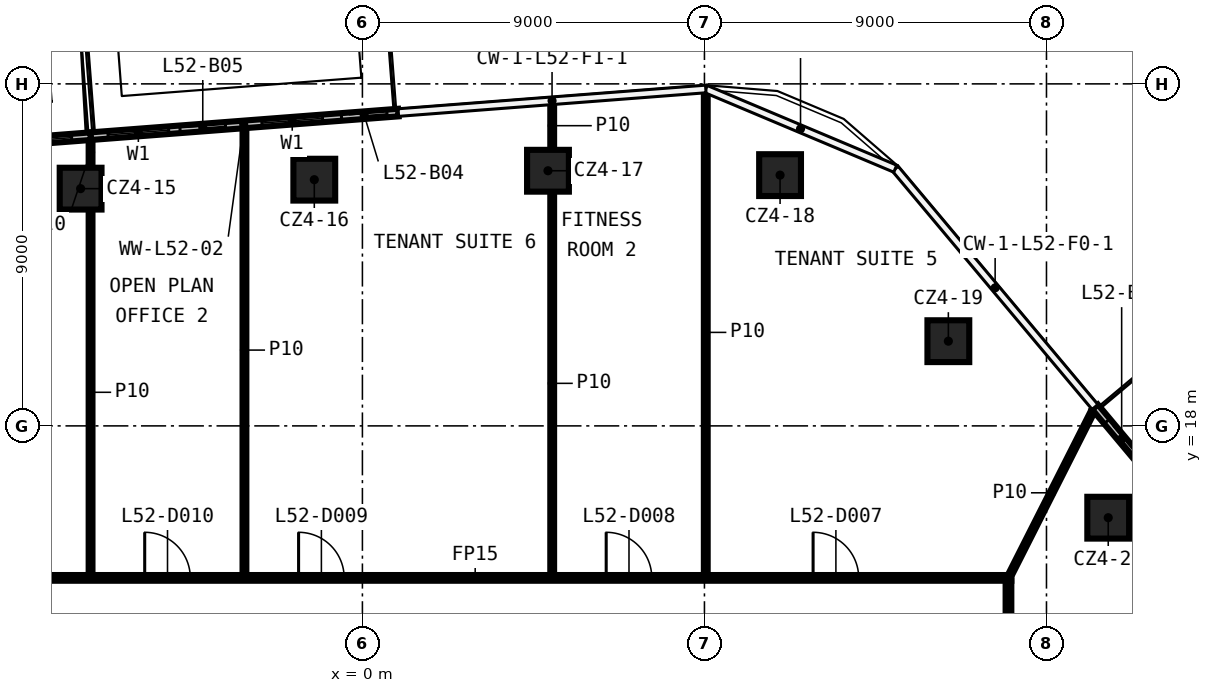
"""IFC4 building model, lengths in metres.
Left out: names, types, materials, properties, quantities, classifications, styles, units other than length and angle.
Written with IfcOpenShell. Run it as: python <this file> out.ifc"""

import sys

from ifc_helpers import new_model, si_unit, direction, frame, frame_2d, origin, origin_2d, place, context, subcontext, project, spatial, rectangle, extrude, element, fill, save


model = new_model("IFC4")
c1 = context("Model", 3, precision=1e-05, world=origin(), true_north=direction((0.0, 1.0)))
c2 = subcontext(c1, "Body", "Model", "MODEL_VIEW")
j1 = project(units=[si_unit("LENGTHUNIT", "METRE"), si_unit("PLANEANGLEUNIT", "RADIAN")], contexts=[c1])
p1 = place(None, origin())
s1 = spatial("IfcSite", under=j1, at=p1, CompositionType="ELEMENT")
p2 = place(p1, origin())
s2 = spatial("IfcBuilding", under=s1, at=p2, CompositionType="ELEMENT")
p3 = place(p2, frame((0.0, 0.0, 249.6)))
s3 = spatial("IfcBuildingStorey", under=s2, at=p3, CompositionType="ELEMENT", Elevation=249.6)
for number, where, z_axis, x_axis in (
    (1, (-7.415, 24.243, 0.0), (0.0, 0.0, 1.0), (1.0, 0.0, 0.0)),
    (2, (-1.266, 24.479, 0.0), (0.0, 0.0, 1.0), (1.0, 0.0, 0.0)),
    (3, (4.883, 24.714, 0.0), (0.0, 0.0, 1.0), (1.0, 0.0, 0.0)),
    (4, (10.99, 24.599, 0.0), (0.0, 0.0, 1.0), (1.0, 0.0, 0.0)),
    (5, (15.418, 20.229, 0.0), (0.0, 0.0, 1.0), (1.0, 0.0, 0.0)),
    (6, (19.625, 15.584, 0.0), (0.0, 0.0, 1.0), (1.0, 0.0, 0.0)),
):
    element("IfcColumn", number, at=place(p3, frame(where, z_axis=z_axis, x_axis=x_axis)), inside=s3, PredefinedType="COLUMN", context=c2, shape_type="SweptSolid", body=[
        extrude(rectangle(XDim=1.1, YDim=1.1, at=origin_2d()), origin(), (0.0, 0.0, 1.0), 3.82),
    ])
p4 = place(p3, frame((-9.075, 14.0, 0.0), z_axis=(0.0, 0.0, 1.0), x_axis=(1.0, 0.0, 0.0)))
e7 = element("IfcWall", 7, at=p4, inside=s3, PredefinedType="PARTITIONING", context=c2, shape_type="SweptSolid", body=[
    extrude(rectangle(XDim=26.15, YDim=0.15, at=frame_2d((13.075, 0.0))), origin(), (0.0, 0.0, 1.0), 3.82),
])
p5 = place(p4, frame((20.934, 0.0, 0.0)))
e8 = element("IfcOpeningElement", 8, at=p5, cuts=e7, PredefinedType="OPENING", context=c2, shape_type="SweptSolid", body=[
    extrude(rectangle(XDim=1.2, YDim=2.1, at=frame_2d((0.6, 1.05))), frame((0.0, 0.085, 0.0), z_axis=(0.0, -1.0, 0.0), x_axis=(1.0, 0.0, 0.0)), (0.0, 0.0, 1.0), 0.17),
])
p6 = place(p4, frame((15.49, 0.0, 0.0)))
e9 = element("IfcOpeningElement", 9, at=p6, cuts=e7, PredefinedType="OPENING", context=c2, shape_type="SweptSolid", body=[
    extrude(rectangle(XDim=1.2, YDim=2.1, at=frame_2d((0.6, 1.05))), frame((0.0, 0.085, 0.0), z_axis=(0.0, -1.0, 0.0), x_axis=(1.0, 0.0, 0.0)), (0.0, 0.0, 1.0), 0.17),
])
p7 = place(p4, frame((7.396, 0.0, 0.0)))
e10 = element("IfcOpeningElement", 10, at=p7, cuts=e7, PredefinedType="OPENING", context=c2, shape_type="SweptSolid", body=[
    extrude(rectangle(XDim=1.2, YDim=2.1, at=frame_2d((0.6, 1.05))), frame((0.0, 0.085, 0.0), z_axis=(0.0, -1.0, 0.0), x_axis=(1.0, 0.0, 0.0)), (0.0, 0.0, 1.0), 0.17),
])
p8 = place(p4, frame((3.346, 0.0, 0.0)))
e11 = element("IfcOpeningElement", 11, at=p8, cuts=e7, PredefinedType="OPENING", context=c2, shape_type="SweptSolid", body=[
    extrude(rectangle(XDim=1.2, YDim=2.1, at=frame_2d((0.6, 1.05))), frame((0.0, 0.085, 0.0), z_axis=(0.0, -1.0, 0.0), x_axis=(1.0, 0.0, 0.0)), (0.0, 0.0, 1.0), 0.17),
])
p9 = place(p3, frame((17.0, 14.0, 0.0), z_axis=(0.0, 0.0, 1.0), x_axis=(0.451643796449, 0.892198341811, 0.0)))
e12 = element("IfcWall", 12, at=p9, inside=s3, PredefinedType="PARTITIONING", context=c2, shape_type="SweptSolid", body=[
    extrude(rectangle(XDim=5.02, YDim=0.1, at=frame_2d((2.51, 0.0))), origin(), (0.0, 0.0, 1.0), 3.82),
])
p10 = place(p3, frame((17.0, 13.925, 0.0), z_axis=(0.0, 0.0, 1.0), x_axis=(0.0, -1.0, 0.0)))
e13 = element("IfcWall", 13, at=p10, inside=s3, PredefinedType="PARTITIONING", context=c2, shape_type="SweptSolid", body=[
    extrude(rectangle(XDim=27.85, YDim=0.15, at=frame_2d((13.925, 0.0))), origin(), (0.0, 0.0, 1.0), 3.82),
])
p11 = place(p10, frame((16.802, 0.0, 0.0)))
e14 = element("IfcOpeningElement", 14, at=p11, cuts=e13, PredefinedType="OPENING", context=c2, shape_type="SweptSolid", body=[
    extrude(rectangle(XDim=1.2, YDim=2.1, at=frame_2d((0.6, 1.05))), frame((0.0, 0.085, 0.0), z_axis=(0.0, -1.0, 0.0), x_axis=(1.0, 0.0, 0.0)), (0.0, 0.0, 1.0), 0.17),
])
p12 = place(p10, frame((12.534, 0.0, 0.0)))
e15 = element("IfcOpeningElement", 15, at=p12, cuts=e13, PredefinedType="OPENING", context=c2, shape_type="SweptSolid", body=[
    extrude(rectangle(XDim=1.2, YDim=2.1, at=frame_2d((0.6, 1.05))), frame((0.0, 0.085, 0.0), z_axis=(0.0, -1.0, 0.0), x_axis=(1.0, 0.0, 0.0)), (0.0, 0.0, 1.0), 0.17),
])
p13 = place(p3, frame((9.035, 14.075, 0.0), z_axis=(0.0, 0.0, 1.0), x_axis=(0.0, 1.0, 0.0)))
e16 = element("IfcWall", 16, at=p13, inside=s3, PredefinedType="PARTITIONING", context=c2, shape_type="SweptSolid", body=[
    extrude(rectangle(XDim=12.771, YDim=0.1, at=frame_2d((6.385, 0.0))), origin(), (0.0, 0.0, 1.0), 3.82),
])
p14 = place(p3, frame((4.994, 14.075, 0.0), z_axis=(0.0, 0.0, 1.0), x_axis=(0.0, 1.0, 0.0)))
e17 = element("IfcWall", 17, at=p14, inside=s3, PredefinedType="PARTITIONING", context=c2, shape_type="SweptSolid", body=[
    extrude(rectangle(XDim=10.089, YDim=0.1, at=frame_2d((5.044, 0.0))), origin(), (0.0, 0.0, 1.0), 3.82),
])
p15 = place(p3, frame((4.994, 25.264, 0.0), z_axis=(0.0, 0.0, 1.0), x_axis=(0.0, 1.0, 0.0)))
e18 = element("IfcWall", 18, at=p15, inside=s3, PredefinedType="PARTITIONING", context=c2, shape_type="SweptSolid", body=[
    extrude(rectangle(XDim=1.272, YDim=0.1, at=frame_2d((0.636, 0.0))), origin(), (0.0, 0.0, 1.0), 3.82),
])
p16 = place(p3, frame((-3.104, 14.075, 0.0), z_axis=(0.0, 0.0, 1.0), x_axis=(0.0, 1.0, 0.0)))
e19 = element("IfcWall", 19, at=p16, inside=s3, PredefinedType="PARTITIONING", context=c2, shape_type="SweptSolid", body=[
    extrude(rectangle(XDim=11.839, YDim=0.1, at=frame_2d((5.92, 0.0))), origin(), (0.0, 0.0, 1.0), 3.82),
])
p17 = place(p3, frame((-7.153, 14.075, 0.0), z_axis=(0.0, 0.0, 1.0), x_axis=(0.0, 1.0, 0.0)))
e20 = element("IfcWall", 20, at=p17, inside=s3, PredefinedType="PARTITIONING", context=c2, shape_type="SweptSolid", body=[
    extrude(rectangle(XDim=9.618, YDim=0.1, at=frame_2d((4.809, 0.0))), origin(), (0.0, 0.0, 1.0), 3.82),
])
p18 = place(p3, frame((-7.153, 24.793, 0.0), z_axis=(0.0, 0.0, 1.0), x_axis=(0.0, 1.0, 0.0)))
e21 = element("IfcWall", 21, at=p18, inside=s3, PredefinedType="PARTITIONING", context=c2, shape_type="SweptSolid", body=[
    extrude(rectangle(XDim=0.811, YDim=0.1, at=frame_2d((0.405, 0.0))), origin(), (0.0, 0.0, 1.0), 3.82),
])
p19 = place(p3, frame((27.162, 9.091, 0.0), z_axis=(0.0, 0.0, 1.0), x_axis=(-0.642398297857, 0.766370946025, 0.0)))
e22 = element("IfcWall", 22, at=p19, inside=s3, PredefinedType="SOLIDWALL", context=c2, shape_type="SweptSolid", body=[
    extrude(rectangle(XDim=12.275, YDim=0.2, at=frame_2d((6.137, 0.0))), origin(), (0.0, 0.0, 1.0), 3.82),
])
p20 = place(p19, frame((2.0, 0.0, 0.6)))
e23 = element("IfcOpeningElement", 23, at=p20, cuts=e22, PredefinedType="OPENING", context=c2, shape_type="SweptSolid", body=[
    extrude(rectangle(XDim=1.6, YDim=2.4, at=frame_2d((0.8, 1.2))), frame((0.0, 0.11, 0.0), z_axis=(0.0, -1.0, 0.0), x_axis=(1.0, 0.0, 0.0)), (0.0, 0.0, 1.0), 0.22),
])
p21 = place(p19, frame((0.5, 0.0, 0.0)))
e24 = element("IfcOpeningElement", 24, at=p21, cuts=e22, PredefinedType="OPENING", context=c2, shape_type="SweptSolid", body=[
    extrude(rectangle(XDim=1.2, YDim=2.4, at=frame_2d((0.6, 1.2))), frame((0.0, 0.11, 0.0), z_axis=(0.0, -1.0, 0.0), x_axis=(1.0, 0.0, 0.0)), (0.0, 0.0, 1.0), 0.22),
])
p22 = place(p19, frame((6.092, 0.0, 0.6)))
e25 = element("IfcOpeningElement", 25, at=p22, cuts=e22, PredefinedType="OPENING", context=c2, shape_type="SweptSolid", body=[
    extrude(rectangle(XDim=1.6, YDim=2.4, at=frame_2d((0.8, 1.2))), frame((0.0, 0.11, 0.0), z_axis=(0.0, -1.0, 0.0), x_axis=(1.0, 0.0, 0.0)), (0.0, 0.0, 1.0), 0.22),
])
p23 = place(p19, frame((4.592, 0.0, 0.0)))
e26 = element("IfcOpeningElement", 26, at=p23, cuts=e22, PredefinedType="OPENING", context=c2, shape_type="SweptSolid", body=[
    extrude(rectangle(XDim=1.2, YDim=2.4, at=frame_2d((0.6, 1.2))), frame((0.0, 0.11, 0.0), z_axis=(0.0, -1.0, 0.0), x_axis=(1.0, 0.0, 0.0)), (0.0, 0.0, 1.0), 0.22),
])
p24 = place(p19, frame((8.683, 0.0, 0.6)))
e27 = element("IfcOpeningElement", 27, at=p24, cuts=e22, PredefinedType="OPENING", context=c2, shape_type="SweptSolid", body=[
    extrude(rectangle(XDim=1.6, YDim=2.4, at=frame_2d((0.8, 1.2))), frame((0.0, 0.11, 0.0), z_axis=(0.0, -1.0, 0.0), x_axis=(1.0, 0.0, 0.0)), (0.0, 0.0, 1.0), 0.22),
])
p25 = place(p19, frame((10.583, 0.0, 0.0)))
e28 = element("IfcOpeningElement", 28, at=p25, cuts=e22, PredefinedType="OPENING", context=c2, shape_type="SweptSolid", body=[
    extrude(rectangle(XDim=1.2, YDim=2.4, at=frame_2d((0.6, 1.2))), frame((0.0, 0.11, 0.0), z_axis=(0.0, -1.0, 0.0), x_axis=(1.0, 0.0, 0.0)), (0.0, 0.0, 1.0), 0.22),
])
p26 = place(p3, frame((0.945, 26.245, 0.0), z_axis=(0.0, 0.0, 1.0), x_axis=(-0.997069496045, -0.076501111469, 0.0)))
e29 = element("IfcWall", 29, at=p26, inside=s3, PredefinedType="SOLIDWALL", context=c2, shape_type="SweptSolid", body=[
    extrude(rectangle(XDim=8.122, YDim=0.2, at=frame_2d((4.061, 0.0))), origin(), (0.0, 0.0, 1.0), 3.82),
])
p27 = place(p26, frame((2.0, 0.0, 0.6)))
e30 = element("IfcOpeningElement", 30, at=p27, cuts=e29, PredefinedType="OPENING", context=c2, shape_type="SweptSolid", body=[
    extrude(rectangle(XDim=1.6, YDim=2.4, at=frame_2d((0.8, 1.2))), frame((0.0, 0.11, 0.0), z_axis=(0.0, -1.0, 0.0), x_axis=(1.0, 0.0, 0.0)), (0.0, 0.0, 1.0), 0.22),
])
p28 = place(p26, frame((0.3, 0.0, 0.0)))
e31 = element("IfcOpeningElement", 31, at=p28, cuts=e29, PredefinedType="OPENING", context=c2, shape_type="SweptSolid", body=[
    extrude(rectangle(XDim=1.2, YDim=2.4, at=frame_2d((0.6, 1.2))), frame((0.0, 0.11, 0.0), z_axis=(0.0, -1.0, 0.0), x_axis=(1.0, 0.0, 0.0)), (0.0, 0.0, 1.0), 0.22),
])
p29 = place(p26, frame((6.061, 0.0, 0.6)))
e32 = element("IfcOpeningElement", 32, at=p29, cuts=e29, PredefinedType="OPENING", context=c2, shape_type="SweptSolid", body=[
    extrude(rectangle(XDim=1.6, YDim=2.4, at=frame_2d((0.8, 1.2))), frame((0.0, 0.11, 0.0), z_axis=(0.0, -1.0, 0.0), x_axis=(1.0, 0.0, 0.0)), (0.0, 0.0, 1.0), 0.22),
])
p30 = place(p26, frame((4.561, 0.0, 0.0)))
e33 = element("IfcOpeningElement", 33, at=p30, cuts=e29, PredefinedType="OPENING", context=c2, shape_type="SweptSolid", body=[
    extrude(rectangle(XDim=1.2, YDim=2.4, at=frame_2d((0.6, 1.2))), frame((0.0, 0.11, 0.0), z_axis=(0.0, -1.0, 0.0), x_axis=(1.0, 0.0, 0.0)), (0.0, 0.0, 1.0), 0.22),
])
p31 = place(p3, frame((-7.153, 25.624, 0.0), z_axis=(0.0, 0.0, 1.0), x_axis=(-0.997068643963, -0.076512216183, 0.0)))
e34 = element("IfcWall", 34, at=p31, inside=s3, PredefinedType="SOLIDWALL", context=c2, shape_type="SweptSolid", body=[
    extrude(rectangle(XDim=4.052, YDim=0.2, at=frame_2d((2.026, 0.0))), origin(), (0.0, 0.0, 1.0), 3.82),
])
p32 = place(p31, frame((0.5, 0.0, 0.6)))
e35 = element("IfcOpeningElement", 35, at=p32, cuts=e34, PredefinedType="OPENING", context=c2, shape_type="SweptSolid", body=[
    extrude(rectangle(XDim=1.6, YDim=2.4, at=frame_2d((0.8, 1.2))), frame((0.0, 0.11, 0.0), z_axis=(0.0, -1.0, 0.0), x_axis=(1.0, 0.0, 0.0)), (0.0, 0.0, 1.0), 0.22),
])
p33 = place(p31, frame((2.4, 0.0, 0.0)))
e36 = element("IfcOpeningElement", 36, at=p33, cuts=e34, PredefinedType="OPENING", context=c2, shape_type="SweptSolid", body=[
    extrude(rectangle(XDim=1.2, YDim=2.4, at=frame_2d((0.6, 1.2))), frame((0.0, 0.11, 0.0), z_axis=(0.0, -1.0, 0.0), x_axis=(1.0, 0.0, 0.0)), (0.0, 0.0, 1.0), 0.22),
])
p34 = place(p5, origin())
e37 = element("IfcDoor", 37, at=p34, inside=s3, OperationType="SINGLE_SWING_RIGHT", PredefinedType="DOOR", context=c2, shape_type="SweptSolid", body=[
    extrude(rectangle(XDim=1.2, YDim=2.1, at=frame_2d((0.6, 1.05))), frame((0.0, 0.025, 0.0), z_axis=(0.0, -1.0, 0.0), x_axis=(1.0, 0.0, 0.0)), (0.0, 0.0, 1.0), 0.05),
])
fill(e8, e37)
p35 = place(p6, origin())
e38 = element("IfcDoor", 38, at=p35, inside=s3, OperationType="SINGLE_SWING_LEFT", PredefinedType="DOOR", context=c2, shape_type="SweptSolid", body=[
    extrude(rectangle(XDim=1.2, YDim=2.1, at=frame_2d((0.6, 1.05))), frame((0.0, 0.025, 0.0), z_axis=(0.0, -1.0, 0.0), x_axis=(1.0, 0.0, 0.0)), (0.0, 0.0, 1.0), 0.05),
])
fill(e9, e38)
p36 = place(p7, origin())
e39 = element("IfcDoor", 39, at=p36, inside=s3, OperationType="SINGLE_SWING_RIGHT", PredefinedType="DOOR", context=c2, shape_type="SweptSolid", body=[
    extrude(rectangle(XDim=1.2, YDim=2.1, at=frame_2d((0.6, 1.05))), frame((0.0, 0.025, 0.0), z_axis=(0.0, -1.0, 0.0), x_axis=(1.0, 0.0, 0.0)), (0.0, 0.0, 1.0), 0.05),
])
fill(e10, e39)
p37 = place(p8, origin())
e40 = element("IfcDoor", 40, at=p37, inside=s3, OperationType="SINGLE_SWING_LEFT", PredefinedType="DOOR", context=c2, shape_type="SweptSolid", body=[
    extrude(rectangle(XDim=1.2, YDim=2.1, at=frame_2d((0.6, 1.05))), frame((0.0, 0.025, 0.0), z_axis=(0.0, -1.0, 0.0), x_axis=(1.0, 0.0, 0.0)), (0.0, 0.0, 1.0), 0.05),
])
fill(e11, e40)
p38 = place(p25, origin())
e41 = element("IfcDoor", 41, at=p38, inside=s3, OperationType="SLIDING_TO_LEFT", PredefinedType="DOOR", context=c2, shape_type="SweptSolid", body=[
    extrude(rectangle(XDim=1.2, YDim=2.4, at=frame_2d((0.6, 1.2))), frame((0.0, 0.025, 0.0), z_axis=(0.0, -1.0, 0.0), x_axis=(1.0, 0.0, 0.0)), (0.0, 0.0, 1.0), 0.05),
])
fill(e28, e41)
p39 = place(p27, origin())
e42 = element("IfcWindow", 42, at=p39, inside=s3, PartitioningType="SINGLE_PANEL", PredefinedType="WINDOW", context=c2, shape_type="SweptSolid", body=[
    extrude(rectangle(XDim=1.6, YDim=2.4, at=frame_2d((0.8, 1.2))), frame((0.0, 0.03, 0.0), z_axis=(0.0, -1.0, 0.0), x_axis=(1.0, 0.0, 0.0)), (0.0, 0.0, 1.0), 0.06),
])
fill(e30, e42)
p40 = place(p28, origin())
e43 = element("IfcDoor", 43, at=p40, inside=s3, OperationType="SLIDING_TO_LEFT", PredefinedType="DOOR", context=c2, shape_type="SweptSolid", body=[
    extrude(rectangle(XDim=1.2, YDim=2.4, at=frame_2d((0.6, 1.2))), frame((0.0, 0.025, 0.0), z_axis=(0.0, -1.0, 0.0), x_axis=(1.0, 0.0, 0.0)), (0.0, 0.0, 1.0), 0.05),
])
fill(e31, e43)
p41 = place(p29, origin())
e44 = element("IfcWindow", 44, at=p41, inside=s3, PartitioningType="SINGLE_PANEL", PredefinedType="WINDOW", context=c2, shape_type="SweptSolid", body=[
    extrude(rectangle(XDim=1.6, YDim=2.4, at=frame_2d((0.8, 1.2))), frame((0.0, 0.03, 0.0), z_axis=(0.0, -1.0, 0.0), x_axis=(1.0, 0.0, 0.0)), (0.0, 0.0, 1.0), 0.06),
])
fill(e32, e44)
p42 = place(p30, origin())
e45 = element("IfcDoor", 45, at=p42, inside=s3, OperationType="SLIDING_TO_LEFT", PredefinedType="DOOR", context=c2, shape_type="SweptSolid", body=[
    extrude(rectangle(XDim=1.2, YDim=2.4, at=frame_2d((0.6, 1.2))), frame((0.0, 0.025, 0.0), z_axis=(0.0, -1.0, 0.0), x_axis=(1.0, 0.0, 0.0)), (0.0, 0.0, 1.0), 0.05),
])
fill(e33, e45)
p43 = place(p32, origin())
e46 = element("IfcWindow", 46, at=p43, inside=s3, PartitioningType="SINGLE_PANEL", PredefinedType="WINDOW", context=c2, shape_type="SweptSolid", body=[
    extrude(rectangle(XDim=1.6, YDim=2.4, at=frame_2d((0.8, 1.2))), frame((0.0, 0.03, 0.0), z_axis=(0.0, -1.0, 0.0), x_axis=(1.0, 0.0, 0.0)), (0.0, 0.0, 1.0), 0.06),
])
fill(e35, e46)
save(model, sys.argv[1])
